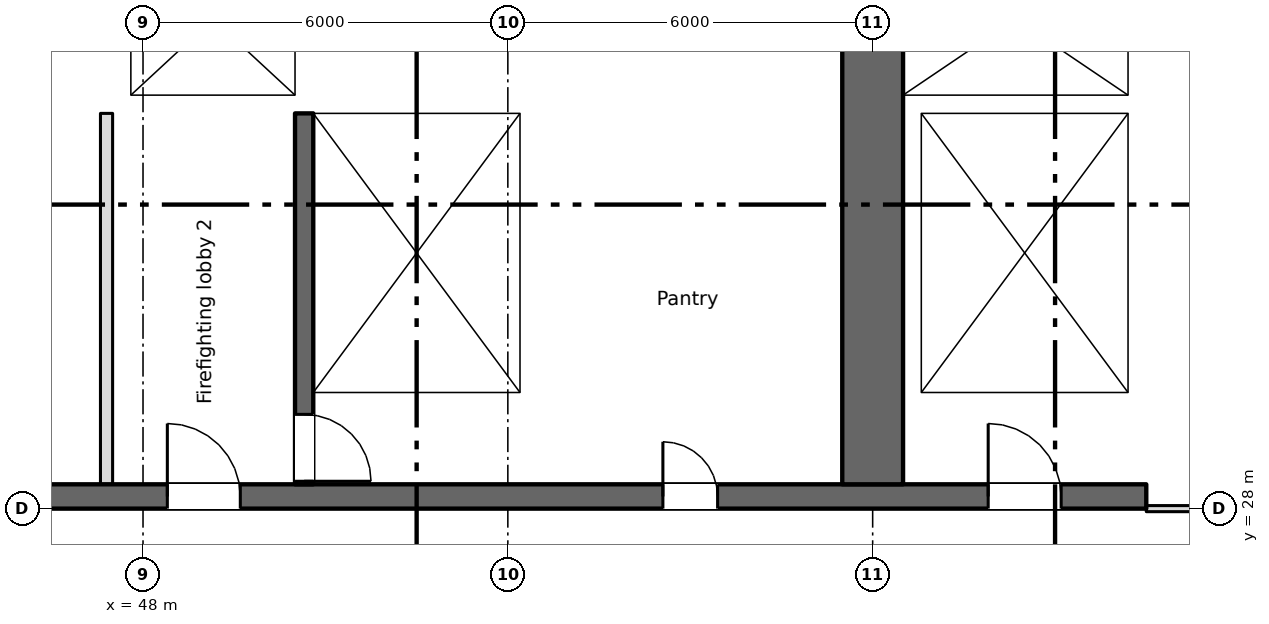
"""IFC4 building model, lengths in metres.
Left out: names, types, materials, properties, quantities, classifications, styles, units other than length and angle.
Written with IfcOpenShell. Run it as: python <this file> out.ifc"""

import sys

from ifc_helpers import new_model, si_unit, direction, frame, frame_2d, origin, place, context, subcontext, project, spatial, rectangle, extrude, element, fill, save


model = new_model("IFC4")
c1 = context("Model", 3, precision=1e-05, world=origin(), true_north=direction((0.0, 1.0)))
c2 = subcontext(c1, "Body", "Model", "MODEL_VIEW")
j1 = project(units=[si_unit("LENGTHUNIT", "METRE"), si_unit("PLANEANGLEUNIT", "RADIAN")], contexts=[c1])
p1 = place(None, origin())
s1 = spatial("IfcSite", under=j1, at=p1, CompositionType="ELEMENT")
p2 = place(p1, origin())
s2 = spatial("IfcBuilding", under=s1, at=p2, CompositionType="ELEMENT")
p3 = place(p2, frame((0.0, 0.0, 71.25)))
s3 = spatial("IfcBuildingStorey", under=s2, at=p3, CompositionType="ELEMENT", Elevation=71.25)
p4 = place(p3, frame((6.7, 28.2, 0.0), z_axis=(0.0, 0.0, 1.0), x_axis=(1.0, 0.0, 0.0)))
e1 = element("IfcWall", 1, at=p4, inside=s3, PredefinedType="SHEAR", context=c2, shape_type="SweptSolid", body=[
    extrude(rectangle(XDim=57.8, YDim=0.4, at=frame_2d((28.9, 0.0))), origin(), (0.0, 0.0, 1.0), 3.35),
])
p5 = place(p4, frame((12.562, 0.0, 0.0)))
e2 = element("IfcOpeningElement", 2, at=p5, cuts=e1, PredefinedType="OPENING", context=c2, shape_type="SweptSolid", body=[
    extrude(rectangle(XDim=0.9, YDim=2.1, at=frame_2d((0.45, 1.05))), frame((0.0, 0.21, 0.0), z_axis=(0.0, -1.0, 0.0), x_axis=(1.0, 0.0, 0.0)), (0.0, 0.0, 1.0), 0.42),
])
p6 = place(p4, frame((15.137, 0.0, 0.0)))
e3 = element("IfcOpeningElement", 3, at=p6, cuts=e1, PredefinedType="OPENING", context=c2, shape_type="SweptSolid", body=[
    extrude(rectangle(XDim=0.9, YDim=2.1, at=frame_2d((0.45, 1.05))), frame((0.0, 0.21, 0.0), z_axis=(0.0, -1.0, 0.0), x_axis=(1.0, 0.0, 0.0)), (0.0, 0.0, 1.0), 0.42),
])
p7 = place(p4, frame((49.85, 0.0, 0.0)))
e4 = element("IfcOpeningElement", 4, at=p7, cuts=e1, PredefinedType="OPENING", context=c2, shape_type="SweptSolid", body=[
    extrude(rectangle(XDim=0.9, YDim=2.1, at=frame_2d((0.45, 1.05))), frame((0.0, 0.21, 0.0), z_axis=(0.0, -1.0, 0.0), x_axis=(1.0, 0.0, 0.0)), (0.0, 0.0, 1.0), 0.42),
])
p8 = place(p4, frame((0.562, 0.0, 0.0)))
e5 = element("IfcOpeningElement", 5, at=p8, cuts=e1, PredefinedType="OPENING", context=c2, shape_type="SweptSolid", body=[
    extrude(rectangle(XDim=0.9, YDim=2.1, at=frame_2d((0.45, 1.05))), frame((0.0, 0.21, 0.0), z_axis=(0.0, -1.0, 0.0), x_axis=(1.0, 0.0, 0.0)), (0.0, 0.0, 1.0), 0.42),
])
p9 = place(p4, frame((2.137, 0.0, 0.0)))
e6 = element("IfcOpeningElement", 6, at=p9, cuts=e1, PredefinedType="OPENING", context=c2, shape_type="SweptSolid", body=[
    extrude(rectangle(XDim=0.9, YDim=2.1, at=frame_2d((0.45, 1.05))), frame((0.0, 0.21, 0.0), z_axis=(0.0, -1.0, 0.0), x_axis=(1.0, 0.0, 0.0)), (0.0, 0.0, 1.0), 0.42),
])
p10 = place(p4, frame((4.7, 0.0, 0.0)))
e7 = element("IfcOpeningElement", 7, at=p10, cuts=e1, PredefinedType="OPENING", context=c2, shape_type="SweptSolid", body=[
    extrude(rectangle(XDim=1.2, YDim=2.1, at=frame_2d((0.6, 1.05))), frame((0.0, 0.21, 0.0), z_axis=(0.0, -1.0, 0.0), x_axis=(1.0, 0.0, 0.0)), (0.0, 0.0, 1.0), 0.42),
])
p11 = place(p4, frame((31.7, 0.0, 0.0)))
e8 = element("IfcOpeningElement", 8, at=p11, cuts=e1, PredefinedType="OPENING", context=c2, shape_type="SweptSolid", body=[
    extrude(rectangle(XDim=1.2, YDim=2.1, at=frame_2d((0.6, 1.05))), frame((0.0, 0.21, 0.0), z_axis=(0.0, -1.0, 0.0), x_axis=(1.0, 0.0, 0.0)), (0.0, 0.0, 1.0), 0.42),
])
p12 = place(p4, frame((55.2, 0.0, 0.0)))
e9 = element("IfcOpeningElement", 9, at=p12, cuts=e1, PredefinedType="OPENING", context=c2, shape_type="SweptSolid", body=[
    extrude(rectangle(XDim=1.2, YDim=2.1, at=frame_2d((0.6, 1.05))), frame((0.0, 0.21, 0.0), z_axis=(0.0, -1.0, 0.0), x_axis=(1.0, 0.0, 0.0)), (0.0, 0.0, 1.0), 0.42),
])
p13 = place(p4, frame((21.7, 0.0, 0.0)))
e10 = element("IfcOpeningElement", 10, at=p13, cuts=e1, PredefinedType="OPENING", context=c2, shape_type="SweptSolid", body=[
    extrude(rectangle(XDim=1.2, YDim=2.1, at=frame_2d((0.6, 1.05))), frame((0.0, 0.21, 0.0), z_axis=(0.0, -1.0, 0.0), x_axis=(1.0, 0.0, 0.0)), (0.0, 0.0, 1.0), 0.42),
])
p14 = place(p4, frame((41.7, 0.0, 0.0)))
e11 = element("IfcOpeningElement", 11, at=p14, cuts=e1, PredefinedType="OPENING", context=c2, shape_type="SweptSolid", body=[
    extrude(rectangle(XDim=1.2, YDim=2.1, at=frame_2d((0.6, 1.05))), frame((0.0, 0.21, 0.0), z_axis=(0.0, -1.0, 0.0), x_axis=(1.0, 0.0, 0.0)), (0.0, 0.0, 1.0), 0.42),
])
p15 = place(p4, frame((24.85, 0.0, 0.0)))
e12 = element("IfcOpeningElement", 12, at=p15, cuts=e1, PredefinedType="OPENING", context=c2, shape_type="SweptSolid", body=[
    extrude(rectangle(XDim=2.4, YDim=2.1, at=frame_2d((1.2, 1.05))), frame((0.0, 0.21, 0.0), z_axis=(0.0, -1.0, 0.0), x_axis=(1.0, 0.0, 0.0)), (0.0, 0.0, 1.0), 0.42),
])
p16 = place(p4, frame((37.35, 0.0, 0.0)))
e13 = element("IfcOpeningElement", 13, at=p16, cuts=e1, PredefinedType="OPENING", context=c2, shape_type="SweptSolid", body=[
    extrude(rectangle(XDim=2.4, YDim=2.1, at=frame_2d((1.2, 1.05))), frame((0.0, 0.21, 0.0), z_axis=(0.0, -1.0, 0.0), x_axis=(1.0, 0.0, 0.0)), (0.0, 0.0, 1.0), 0.42),
])
p17 = place(p4, frame((7.85, 0.0, 0.0)))
e14 = element("IfcOpeningElement", 14, at=p17, cuts=e1, PredefinedType="OPENING", context=c2, shape_type="SweptSolid", body=[
    extrude(rectangle(XDim=2.4, YDim=2.1, at=frame_2d((1.2, 1.05))), frame((0.0, 0.21, 0.0), z_axis=(0.0, -1.0, 0.0), x_axis=(1.0, 0.0, 0.0)), (0.0, 0.0, 1.0), 0.42),
])
p18 = place(p4, frame((28.85, 0.0, 0.0)))
e15 = element("IfcOpeningElement", 15, at=p18, cuts=e1, PredefinedType="OPENING", context=c2, shape_type="SweptSolid", body=[
    extrude(rectangle(XDim=0.9, YDim=2.1, at=frame_2d((0.45, 1.05))), frame((0.0, 0.21, 0.0), z_axis=(0.0, -1.0, 0.0), x_axis=(1.0, 0.0, 0.0)), (0.0, 0.0, 1.0), 0.42),
])
p19 = place(p4, frame((34.85, 0.0, 0.0)))
e16 = element("IfcOpeningElement", 16, at=p19, cuts=e1, PredefinedType="OPENING", context=c2, shape_type="SweptSolid", body=[
    extrude(rectangle(XDim=0.9, YDim=2.1, at=frame_2d((0.45, 1.05))), frame((0.0, 0.21, 0.0), z_axis=(0.0, -1.0, 0.0), x_axis=(1.0, 0.0, 0.0)), (0.0, 0.0, 1.0), 0.42),
])
p20 = place(p3, frame((64.35, 34.8, 0.0), z_axis=(0.0, 0.0, 1.0), x_axis=(0.0, 1.0, 0.0)))
e17 = element("IfcWall", 17, at=p20, inside=s3, PredefinedType="SHEAR", context=c2, shape_type="SweptSolid", body=[
    extrude(rectangle(XDim=10.2, YDim=0.3, at=frame_2d((5.1, 0.0))), origin(), (0.0, 0.0, 1.0), 3.35),
])
p21 = place(p3, frame((60.0, 28.4, 0.0), z_axis=(0.0, 0.0, 1.0), x_axis=(0.0, 1.0, 0.0)))
e18 = element("IfcWall", 18, at=p21, inside=s3, PredefinedType="SHEAR", context=c2, shape_type="SweptSolid", body=[
    extrude(rectangle(XDim=16.6, YDim=1.0, at=frame_2d((8.3, 0.0))), origin(), (0.0, 0.0, 1.0), 3.35),
])
p22 = place(p21, frame((9.6, 0.0, 0.0)))
e19 = element("IfcOpeningElement", 19, at=p22, cuts=e18, PredefinedType="OPENING", context=c2, shape_type="SweptSolid", body=[
    extrude(rectangle(XDim=2.0, YDim=2.1, at=frame_2d((1.0, 1.05))), frame((0.0, 0.51, 0.0), z_axis=(0.0, -1.0, 0.0), x_axis=(1.0, 0.0, 0.0)), (0.0, 0.0, 1.0), 1.02),
])
p23 = place(p21, frame((15.25, 0.0, 0.0)))
e20 = element("IfcOpeningElement", 20, at=p23, cuts=e18, PredefinedType="OPENING", context=c2, shape_type="SweptSolid", body=[
    extrude(rectangle(XDim=1.2, YDim=2.1, at=frame_2d((0.6, 1.05))), frame((0.0, 0.51, 0.0), z_axis=(0.0, -1.0, 0.0), x_axis=(1.0, 0.0, 0.0)), (0.0, 0.0, 1.0), 1.02),
])
p24 = place(p3, frame((50.65, 34.5, 0.0), z_axis=(0.0, 0.0, 1.0), x_axis=(0.0, -1.0, 0.0)))
e21 = element("IfcWall", 21, at=p24, inside=s3, PredefinedType="SHEAR", context=c2, shape_type="SweptSolid", body=[
    extrude(rectangle(XDim=6.1, YDim=0.3, at=frame_2d((3.05, 0.0))), origin(), (0.0, 0.0, 1.0), 3.35),
])
p25 = place(p24, frame((4.95, 0.0, 0.0)))
e22 = element("IfcOpeningElement", 22, at=p25, cuts=e21, PredefinedType="OPENING", context=c2, shape_type="SweptSolid", body=[
    extrude(rectangle(XDim=1.1, YDim=2.1, at=frame_2d((0.55, 1.05))), frame((0.0, 0.16, 0.0), z_axis=(0.0, -1.0, 0.0), x_axis=(1.0, 0.0, 0.0)), (0.0, 0.0, 1.0), 0.32),
])
for number, where, z_axis, x_axis in (
    (23, (54.35, 28.4, 0.0), (0.0, 0.0, 1.0), (0.0, 1.0, 0.0)),
    (24, (60.65, 28.4, 0.0), (0.0, 0.0, 1.0), (0.0, 1.0, 0.0)),
    (25, (64.35, 28.4, 0.0), (0.0, 0.0, 1.0), (0.0, 1.0, 0.0)),
):
    element("IfcWall", number, at=place(p3, frame(where, z_axis=z_axis, x_axis=x_axis)), inside=s3, PredefinedType="SHEAR", context=c2, shape_type="SweptSolid", body=[
        extrude(rectangle(XDim=6.1, YDim=0.3, at=frame_2d((3.05, 0.0))), origin(), (0.0, 0.0, 1.0), 3.35),
    ])
p26 = place(p3, frame((47.3, 34.65, 0.0), z_axis=(0.0, 0.0, 1.0), x_axis=(1.0, 0.0, 0.0)))
e26 = element("IfcWall", 26, at=p26, inside=s3, PredefinedType="SHEAR", context=c2, shape_type="SweptSolid", body=[
    extrude(rectangle(XDim=12.2, YDim=0.3, at=frame_2d((6.1, 0.0))), origin(), (0.0, 0.0, 1.0), 3.35),
])
p27 = place(p26, frame((1.3, 0.0, 0.0)))
e27 = element("IfcOpeningElement", 27, at=p27, cuts=e26, PredefinedType="OPENING", context=c2, shape_type="SweptSolid", body=[
    extrude(rectangle(XDim=1.1, YDim=2.1, at=frame_2d((0.55, 1.05))), frame((0.0, 0.16, 0.0), z_axis=(0.0, -1.0, 0.0), x_axis=(1.0, 0.0, 0.0)), (0.0, 0.0, 1.0), 0.32),
])
p28 = place(p3, frame((60.5, 34.65, 0.0), z_axis=(0.0, 0.0, 1.0), x_axis=(1.0, 0.0, 0.0)))
e28 = element("IfcWall", 28, at=p28, inside=s3, PredefinedType="SHEAR", context=c2, shape_type="SweptSolid", body=[
    extrude(rectangle(XDim=4.0, YDim=0.3, at=frame_2d((2.0, 0.0))), origin(), (0.0, 0.0, 1.0), 3.35),
])
p29 = place(p3, frame((47.55, 34.8, 0.0), z_axis=(0.0, 0.0, 1.0), x_axis=(0.0, 1.0, 0.0)))
e29 = element("IfcWall", 29, at=p29, inside=s3, PredefinedType="SHEAR", context=c2, shape_type="SweptSolid", body=[
    extrude(rectangle(XDim=2.5, YDim=0.5, at=frame_2d((1.25, 0.0))), origin(), (0.0, 0.0, 1.0), 3.35),
])
p30 = place(p3, frame((50.65, 34.8, 0.0), z_axis=(0.0, 0.0, 1.0), x_axis=(0.0, 1.0, 0.0)))
e30 = element("IfcWall", 30, at=p30, inside=s3, PredefinedType="SHEAR", context=c2, shape_type="SweptSolid", body=[
    extrude(rectangle(XDim=2.5, YDim=0.3, at=frame_2d((1.25, 0.0))), origin(), (0.0, 0.0, 1.0), 3.35),
])
p31 = place(p3, frame((47.4, 28.4, 0.0), z_axis=(0.0, 0.0, 1.0), x_axis=(0.0, 1.0, 0.0)))
e31 = element("IfcWall", 31, at=p31, inside=s3, PredefinedType="PARTITIONING", context=c2, shape_type="SweptSolid", body=[
    extrude(rectangle(XDim=6.1, YDim=0.2, at=frame_2d((3.05, 0.0))), origin(), (0.0, 0.0, 1.0), 3.35),
])
p32 = place(p3, frame((64.5, 28.0, 0.0), z_axis=(0.0, 0.0, 1.0), x_axis=(1.0, 0.0, 0.0)))
e32 = element("IfcWall", 32, at=p32, inside=s3, PredefinedType="PARTITIONING", context=c2, shape_type="SweptSolid", body=[
    extrude(rectangle(XDim=12.7, YDim=0.1, at=frame_2d((6.35, 0.0))), origin(), (0.0, 0.0, 1.0), 3.35),
])
p33 = place(p32, frame((2.575, 0.0, 0.0)))
e33 = element("IfcOpeningElement", 33, at=p33, cuts=e32, PredefinedType="OPENING", context=c2, shape_type="SweptSolid", body=[
    extrude(rectangle(XDim=1.2, YDim=2.1, at=frame_2d((0.6, 1.05))), frame((0.0, 0.06, 0.0), z_axis=(0.0, -1.0, 0.0), x_axis=(1.0, 0.0, 0.0)), (0.0, 0.0, 1.0), 0.12),
])
p34 = place(p32, frame((8.925, 0.0, 0.0)))
e34 = element("IfcOpeningElement", 34, at=p34, cuts=e32, PredefinedType="OPENING", context=c2, shape_type="SweptSolid", body=[
    extrude(rectangle(XDim=1.2, YDim=2.1, at=frame_2d((0.6, 1.05))), frame((0.0, 0.06, 0.0), z_axis=(0.0, -1.0, 0.0), x_axis=(1.0, 0.0, 0.0)), (0.0, 0.0, 1.0), 0.12),
])
p35 = place(p7, origin())
e35 = element("IfcDoor", 35, at=p35, inside=s3, OperationType="SINGLE_SWING_LEFT", PredefinedType="DOOR", context=c2, shape_type="SweptSolid", body=[
    extrude(rectangle(XDim=0.9, YDim=2.1, at=frame_2d((0.45, 1.05))), frame((0.0, 0.025, 0.0), z_axis=(0.0, -1.0, 0.0), x_axis=(1.0, 0.0, 0.0)), (0.0, 0.0, 1.0), 0.05),
])
fill(e4, e35)
p36 = place(p27, origin())
e36 = element("IfcDoor", 36, at=p36, inside=s3, OperationType="SLIDING_TO_LEFT", PredefinedType="DOOR", context=c2, shape_type="SweptSolid", body=[
    extrude(rectangle(XDim=1.1, YDim=2.1, at=frame_2d((0.55, 1.05))), frame((0.0, 0.025, 0.0), z_axis=(0.0, -1.0, 0.0), x_axis=(1.0, 0.0, 0.0)), (0.0, 0.0, 1.0), 0.05),
])
fill(e27, e36)
p37 = place(p25, origin())
e37 = element("IfcDoor", 37, at=p37, inside=s3, OperationType="SINGLE_SWING_RIGHT", PredefinedType="DOOR", context=c2, shape_type="SweptSolid", body=[
    extrude(rectangle(XDim=1.1, YDim=2.1, at=frame_2d((0.55, 1.05))), frame((0.0, 0.025, 0.0), z_axis=(0.0, -1.0, 0.0), x_axis=(1.0, 0.0, 0.0)), (0.0, 0.0, 1.0), 0.05),
])
fill(e22, e37)
p38 = place(p12, origin())
e38 = element("IfcDoor", 38, at=p38, inside=s3, OperationType="SINGLE_SWING_LEFT", PredefinedType="DOOR", context=c2, shape_type="SweptSolid", body=[
    extrude(rectangle(XDim=1.2, YDim=2.1, at=frame_2d((0.6, 1.05))), frame((0.0, 0.025, 0.0), z_axis=(0.0, -1.0, 0.0), x_axis=(1.0, 0.0, 0.0)), (0.0, 0.0, 1.0), 0.05),
])
fill(e9, e38)
p39 = place(p14, origin())
e39 = element("IfcDoor", 39, at=p39, inside=s3, OperationType="SINGLE_SWING_LEFT", PredefinedType="DOOR", context=c2, shape_type="SweptSolid", body=[
    extrude(rectangle(XDim=1.2, YDim=2.1, at=frame_2d((0.6, 1.05))), frame((0.0, 0.025, 0.0), z_axis=(0.0, -1.0, 0.0), x_axis=(1.0, 0.0, 0.0)), (0.0, 0.0, 1.0), 0.05),
])
fill(e11, e39)
save(model, sys.argv[1])
